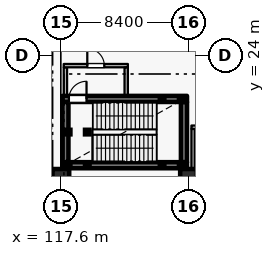
"""IFC4 building model, lengths in metres.
Left out: names, types, materials, properties, quantities, classifications, styles, units other than length and angle.
Written with IfcOpenShell. Run it as: python <this file> out.ifc"""

import sys

from ifc_helpers import new_model, si_unit, direction, frame, frame_2d, origin, origin_2d, place, context, subcontext, project, spatial, rectangle, hollow_rectangle, circle, extrude, element, fill, save


model = new_model("IFC4")
c1 = context("Model", 3, precision=1e-05, world=origin(), true_north=direction((0.0, 1.0)))
c2 = subcontext(c1, "Body", "Model", "MODEL_VIEW")
j1 = project(units=[si_unit("LENGTHUNIT", "METRE"), si_unit("PLANEANGLEUNIT", "RADIAN")], contexts=[c1])
p1 = place(None, origin())
s1 = spatial("IfcSite", under=j1, at=p1, CompositionType="ELEMENT")
p2 = place(p1, origin())
s2 = spatial("IfcBuilding", under=s1, at=p2, CompositionType="ELEMENT")
p3 = place(p2, frame((0.0, 0.0, 6.0)))
s3 = spatial("IfcBuildingStorey", under=s2, at=p3, CompositionType="ELEMENT", Elevation=6.0)
for number, where, z_axis, x_axis in (
    (1, (117.6, 16.0, 0.0), (0.0, 0.0, 1.0), (1.0, 0.0, 0.0)),
    (2, (126.0, 16.0, 0.0), (0.0, 0.0, 1.0), (1.0, 0.0, 0.0)),
):
    element("IfcColumn", number, at=place(p3, frame(where, z_axis=z_axis, x_axis=x_axis)), inside=s3, PredefinedType="COLUMN", context=c2, shape_type="SweptSolid", body=[
        extrude(circle(Radius=0.55, at=origin_2d()), origin(), (0.0, 0.0, 1.0), 5.4),
    ])
p4 = place(p3, frame((126.3, 13.365, 0.0), z_axis=(0.0, 0.0, 1.0), x_axis=(0.0, 1.0, 0.0)))
e3 = element("IfcWall", 3, at=p4, inside=s3, PredefinedType="PARTITIONING", context=c2, shape_type="SweptSolid", body=[
    extrude(rectangle(XDim=5.82, YDim=0.22, at=frame_2d((2.91, 0.0))), origin(), (0.0, 0.0, 1.0), 3.45),
])
p5 = place(p3, frame((126.19, 19.3, 0.0), z_axis=(0.0, 0.0, 1.0), x_axis=(1.0, 0.0, 0.0)))
e4 = element("IfcWall", 4, at=p5, inside=s3, PredefinedType="PARTITIONING", context=c2, shape_type="SweptSolid", body=[
    extrude(rectangle(XDim=3.82, YDim=0.22, at=frame_2d((1.91, 0.0))), origin(), (0.0, 0.0, 1.0), 5.045),
])
p6 = place(p5, frame((1.35, 0.0, 0.0)))
e5 = element("IfcOpeningElement", 5, at=p6, cuts=e4, PredefinedType="OPENING", context=c2, shape_type="SweptSolid", body=[
    extrude(rectangle(XDim=1.12, YDim=2.2, at=frame_2d((0.56, 1.1))), frame((0.0, 0.12, 0.0), z_axis=(0.0, -1.0, 0.0), x_axis=(1.0, 0.0, 0.0)), (0.0, 0.0, 1.0), 0.24),
])
p7 = place(p3, frame((117.7, 16.8, 0.0), z_axis=(0.0, 0.0, 1.0), x_axis=(1.0, 0.0, 0.0)))
e6 = element("IfcWall", 6, at=p7, inside=s3, PredefinedType="SHEAR", context=c2, shape_type="SweptSolid", body=[
    extrude(rectangle(XDim=8.2, YDim=0.4, at=frame_2d((4.1, 0.0))), origin(), (0.0, 0.0, 1.0), 5.045),
])
p8 = place(p3, frame((125.7, 17.005, 0.0), z_axis=(0.0, 0.0, 1.0), x_axis=(0.0, 1.0, 0.0)))
e7 = element("IfcWall", 7, at=p8, inside=s3, PredefinedType="SHEAR", context=c2, shape_type="SweptSolid", body=[
    extrude(rectangle(XDim=3.95, YDim=0.4, at=frame_2d((1.975, 0.0))), origin(), (0.0, 0.0, 1.0), 5.045),
])
p9 = place(p3, frame((117.7, 21.16, 0.0), z_axis=(0.0, 0.0, 1.0), x_axis=(1.0, 0.0, 0.0)))
e8 = element("IfcWall", 8, at=p9, inside=s3, PredefinedType="SHEAR", context=c2, shape_type="SweptSolid", body=[
    extrude(rectangle(XDim=8.2, YDim=0.4, at=frame_2d((4.1, 0.0))), origin(), (0.0, 0.0, 1.0), 5.045),
])
p10 = place(p9, frame((0.43, 0.0, 0.0)))
e9 = element("IfcOpeningElement", 9, at=p10, cuts=e8, PredefinedType="OPENING", context=c2, shape_type="SweptSolid", body=[
    extrude(rectangle(XDim=1.16, YDim=2.2, at=frame_2d((0.58, 1.1))), frame((0.0, 0.21, 0.0), z_axis=(0.0, -1.0, 0.0), x_axis=(1.0, 0.0, 0.0)), (0.0, 0.0, 1.0), 0.42),
])
p11 = place(p3, frame((117.9, 17.005, 0.0), z_axis=(0.0, 0.0, 1.0), x_axis=(0.0, 1.0, 0.0)))
e10 = element("IfcWall", 10, at=p11, inside=s3, PredefinedType="SHEAR", context=c2, shape_type="SweptSolid", body=[
    extrude(rectangle(XDim=3.95, YDim=0.4, at=frame_2d((1.975, 0.0))), origin(), (0.0, 0.0, 1.0), 5.045),
])
p12 = place(p3, frame((117.9, 21.365, 0.0), z_axis=(0.0, 0.0, 1.0), x_axis=(0.0, 1.0, 0.0)))
e11 = element("IfcWall", 11, at=p12, inside=s3, PredefinedType="PARTITIONING", context=c2, shape_type="SweptSolid", body=[
    extrude(rectangle(XDim=1.87, YDim=0.22, at=frame_2d((0.935, 0.0))), origin(), (0.0, 0.0, 1.0), 3.45),
])
p13 = place(p3, frame((117.79, 23.35, 0.0), z_axis=(0.0, 0.0, 1.0), x_axis=(1.0, 0.0, 0.0)))
e12 = element("IfcWall", 12, at=p13, inside=s3, PredefinedType="PARTITIONING", context=c2, shape_type="SweptSolid", body=[
    extrude(rectangle(XDim=4.22, YDim=0.22, at=frame_2d((2.11, 0.0))), origin(), (0.0, 0.0, 1.0), 5.045),
])
p14 = place(p13, frame((1.55, 0.0, 0.0)))
e13 = element("IfcOpeningElement", 13, at=p14, cuts=e12, PredefinedType="OPENING", context=c2, shape_type="SweptSolid", body=[
    extrude(rectangle(XDim=1.12, YDim=2.2, at=frame_2d((0.56, 1.1))), frame((0.0, 0.12, 0.0), z_axis=(0.0, -1.0, 0.0), x_axis=(1.0, 0.0, 0.0)), (0.0, 0.0, 1.0), 0.24),
])
p15 = place(p3, frame((121.9, 21.365, 0.0), z_axis=(0.0, 0.0, 1.0), x_axis=(0.0, 1.0, 0.0)))
e14 = element("IfcWall", 14, at=p15, inside=s3, PredefinedType="PARTITIONING", context=c2, shape_type="SweptSolid", body=[
    extrude(rectangle(XDim=1.87, YDim=0.22, at=frame_2d((0.935, 0.0))), origin(), (0.0, 0.0, 1.0), 5.045),
])
for number, where, z_axis, x_axis in (
    (15, (118.08, 16.8, 0.0), (0.0, 0.0, 1.0), (1.0, 0.0, 0.0)),
    (16, (118.08, 18.98, 0.0), (0.0, 0.0, 1.0), (1.0, 0.0, 0.0)),
    (17, (119.34, 16.8, 0.0), (0.0, 0.0, 1.0), (1.0, 0.0, 0.0)),
    (18, (119.34, 18.98, 0.0), (0.0, 0.0, 1.0), (1.0, 0.0, 0.0)),
):
    element("IfcColumn", number, at=place(p3, frame(where, z_axis=z_axis, x_axis=x_axis)), inside=s3, PredefinedType="COLUMN", context=c2, shape_type="SweptSolid", body=[
        extrude(hollow_rectangle(XDim=0.3, YDim=0.3, WallThickness=0.012, at=origin_2d()), origin(), (0.0, 0.0, 1.0), 5.22),
    ])
for number, where, z_axis, x_axis in (
    (19, (124.26, 16.8, -3.0), (0.0, 0.0, 1.0), (1.0, 0.0, 0.0)),
    (20, (124.26, 21.16, -3.0), (0.0, 0.0, 1.0), (1.0, 0.0, 0.0)),
    (21, (125.52, 16.8, -3.0), (0.0, 0.0, 1.0), (1.0, 0.0, 0.0)),
    (22, (125.52, 21.16, -3.0), (0.0, 0.0, 1.0), (1.0, 0.0, 0.0)),
):
    element("IfcColumn", number, at=place(p3, frame(where, z_axis=z_axis, x_axis=x_axis)), inside=s3, PredefinedType="COLUMN", context=c2, shape_type="SweptSolid", body=[
        extrude(hollow_rectangle(XDim=0.3, YDim=0.3, WallThickness=0.012, at=origin_2d()), origin(), (0.0, 0.0, 1.0), 5.52),
    ])
p16 = place(p10, origin())
e23 = element("IfcDoor", 23, at=p16, inside=s3, OperationType="SINGLE_SWING_RIGHT", PredefinedType="DOOR", context=c2, shape_type="SweptSolid", body=[
    extrude(rectangle(XDim=1.16, YDim=2.2, at=frame_2d((0.58, 1.1))), frame((0.0, 0.025, 0.0), z_axis=(0.0, -1.0, 0.0), x_axis=(1.0, 0.0, 0.0)), (0.0, 0.0, 1.0), 0.05),
])
fill(e9, e23)
p17 = place(p14, origin())
e24 = element("IfcDoor", 24, at=p17, inside=s3, OperationType="SINGLE_SWING_LEFT", PredefinedType="DOOR", context=c2, shape_type="SweptSolid", body=[
    extrude(rectangle(XDim=1.12, YDim=2.2, at=frame_2d((0.56, 1.1))), frame((0.0, 0.025, 0.0), z_axis=(0.0, -1.0, 0.0), x_axis=(1.0, 0.0, 0.0)), (0.0, 0.0, 1.0), 0.05),
])
fill(e13, e24)
save(model, sys.argv[1])
